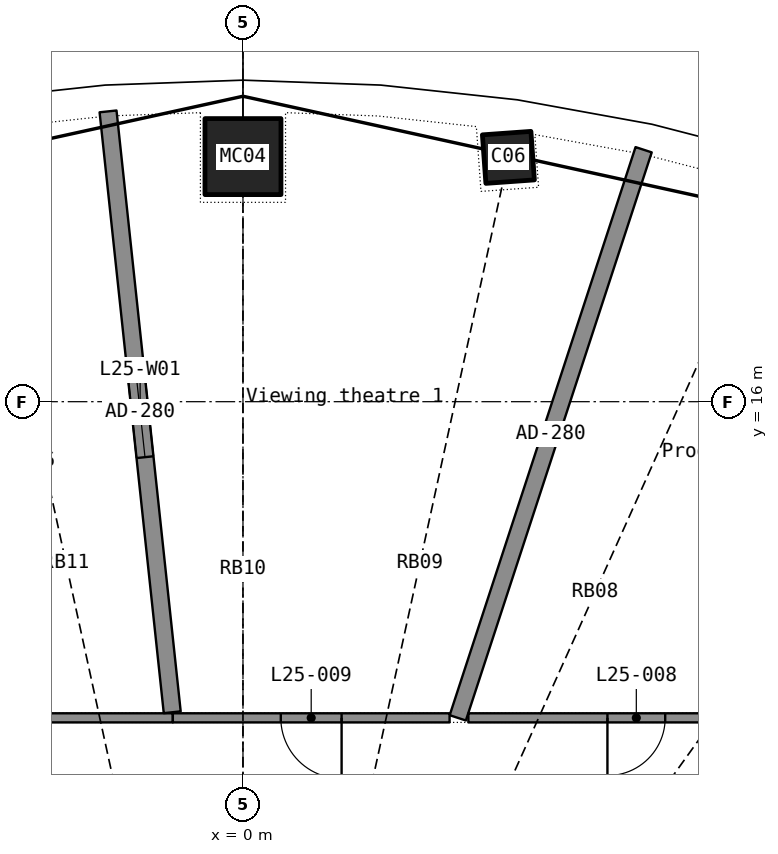
"""IFC4 building model, lengths in metres.
Left out: names, types, materials, properties, quantities, classifications, styles, units other than length and angle.
Written with IfcOpenShell. Run it as: python <this file> out.ifc"""

import sys

from ifc_helpers import new_model, si_unit, direction, frame, frame_2d, origin, origin_2d, place, context, subcontext, project, spatial, rectangle, hollow_rectangle, extrude, element, fill, save


model = new_model("IFC4")
c1 = context("Model", 3, precision=1e-05, world=origin(), true_north=direction((0.0, 1.0)))
c2 = subcontext(c1, "Body", "Model", "MODEL_VIEW")
j1 = project(units=[si_unit("LENGTHUNIT", "METRE"), si_unit("PLANEANGLEUNIT", "RADIAN")], contexts=[c1])
p1 = place(None, origin())
s1 = spatial("IfcSite", under=j1, at=p1, CompositionType="ELEMENT")
p2 = place(p1, origin())
s2 = spatial("IfcBuilding", under=s1, at=p2, CompositionType="ELEMENT")
p3 = place(p2, frame((0.0, 0.0, 108.2)))
s3 = spatial("IfcBuildingStorey", under=s2, at=p3, CompositionType="ELEMENT", Elevation=108.2)
p4 = place(p3, frame((4.365, 20.018, 0.0), z_axis=(-0.006002162, -0.027966118, 0.999590851), x_axis=(0.99018843, -0.139723746, 0.002036574)))
e1 = element("IfcColumn", 1, at=p4, inside=s3, PredefinedType="COLUMN", context=c2, shape_type="SweptSolid", body=[
    extrude(hollow_rectangle(XDim=0.8, YDim=0.8, WallThickness=0.025, at=origin_2d()), origin(), (0.0, 0.0, 1.0), 3.701),
])
p5 = place(p3, frame((0.0, 20.031, 0.0), z_axis=(0.0, -0.02836206, 0.999597716), x_axis=(1.0, 0.0, 0.0)))
e2 = element("IfcColumn", 2, at=p5, inside=s3, PredefinedType="COLUMN", context=c2, shape_type="SweptSolid", body=[
    extrude(hollow_rectangle(XDim=1.25, YDim=1.25, WallThickness=0.032, at=origin_2d()), origin(), (0.0, 0.0, 1.0), 3.701),
])
p6 = place(p3, frame((-1.154, 10.8, 0.0), z_axis=(0.0, 0.0, 1.0), x_axis=(-1.0, 0.0, 0.0)))
e3 = element("IfcWall", 3, at=p6, inside=s3, PredefinedType="PARTITIONING", context=c2, shape_type="SweptSolid", body=[
    extrude(rectangle(XDim=16.646, YDim=0.15, at=frame_2d((8.323, 0.0))), origin(), (0.0, 0.0, 1.0), 2.4),
])
p7 = place(p6, frame((7.723, 0.0, 0.0)))
e4 = element("IfcOpeningElement", 4, at=p7, cuts=e3, PredefinedType="OPENING", context=c2, shape_type="SweptSolid", body=[
    extrude(rectangle(XDim=1.2, YDim=2.2, at=frame_2d((0.6, 1.1))), frame((0.0, 0.085, 0.0), z_axis=(0.0, -1.0, 0.0), x_axis=(1.0, 0.0, 0.0)), (0.0, 0.0, 1.0), 0.17),
])
p8 = place(p3, frame((-2.219, 20.775, 0.0), z_axis=(0.0, 0.0, 1.0), x_axis=(0.106213943, -0.9943433, 0.0)))
e5 = element("IfcWall", 5, at=p8, inside=s3, PredefinedType="PARTITIONING", context=c2, shape_type="SweptSolid", body=[
    extrude(rectangle(XDim=9.939, YDim=0.28, at=frame_2d((4.969, 0.0))), origin(), (0.0, 0.0, 1.0), 2.4),
])
p9 = place(p8, frame((4.219, 0.0, 1.0)))
e6 = element("IfcOpeningElement", 6, at=p9, cuts=e5, PredefinedType="OPENING", context=c2, shape_type="SweptSolid", body=[
    extrude(rectangle(XDim=1.5, YDim=1.2, at=frame_2d((0.75, 0.6))), frame((0.0, 0.15, 0.0), z_axis=(0.0, -1.0, 0.0), x_axis=(1.0, 0.0, 0.0)), (0.0, 0.0, 1.0), 0.3),
])
p10 = place(p3, frame((6.59, 20.144, 0.0), z_axis=(0.0, 0.0, 1.0), x_axis=(-0.310918337, -0.95043663, 0.0)))
e7 = element("IfcWall", 7, at=p10, inside=s3, PredefinedType="PARTITIONING", context=c2, shape_type="SweptSolid", body=[
    extrude(rectangle(XDim=9.831, YDim=0.28, at=frame_2d((4.916, 0.0))), origin(), (0.0, 0.0, 1.0), 2.4),
])
p11 = place(p3, frame((9.231, 10.8, 0.0), z_axis=(0.0, 0.0, 1.0), x_axis=(-1.0, 0.0, 0.0)))
e8 = element("IfcWall", 8, at=p11, inside=s3, PredefinedType="PARTITIONING", context=c2, shape_type="SweptSolid", body=[
    extrude(rectangle(XDim=5.524, YDim=0.15, at=frame_2d((2.762, 0.0))), origin(), (0.0, 0.0, 1.0), 2.4),
])
p12 = place(p11, frame((2.287, 0.0, 0.0)))
e9 = element("IfcOpeningElement", 9, at=p12, cuts=e8, PredefinedType="OPENING", context=c2, shape_type="SweptSolid", body=[
    extrude(rectangle(XDim=0.95, YDim=2.15, at=frame_2d((0.475, 1.075))), frame((0.0, 0.085, 0.0), z_axis=(0.0, -1.0, 0.0), x_axis=(1.0, 0.0, 0.0)), (0.0, 0.0, 1.0), 0.17),
])
p13 = place(p3, frame((3.398, 10.8, 0.0), z_axis=(0.0, 0.0, 1.0), x_axis=(-1.0, 0.0, 0.0)))
e10 = element("IfcWall", 10, at=p13, inside=s3, PredefinedType="PARTITIONING", context=c2, shape_type="SweptSolid", body=[
    extrude(rectangle(XDim=4.551, YDim=0.15, at=frame_2d((2.276, 0.0))), origin(), (0.0, 0.0, 1.0), 2.4),
])
p14 = place(p13, frame((1.776, 0.0, 0.0)))
e11 = element("IfcOpeningElement", 11, at=p14, cuts=e10, PredefinedType="OPENING", context=c2, shape_type="SweptSolid", body=[
    extrude(rectangle(XDim=1.0, YDim=2.2, at=frame_2d((0.5, 1.1))), frame((0.0, 0.085, 0.0), z_axis=(0.0, -1.0, 0.0), x_axis=(1.0, 0.0, 0.0)), (0.0, 0.0, 1.0), 0.17),
])
p15 = place(p12, origin())
e12 = element("IfcDoor", 12, at=p15, inside=s3, OperationType="SINGLE_SWING_RIGHT", PredefinedType="DOOR", context=c2, shape_type="SweptSolid", body=[
    extrude(rectangle(XDim=0.95, YDim=2.15, at=frame_2d((0.475, 1.075))), frame((0.0, 0.025, 0.0), z_axis=(0.0, -1.0, 0.0), x_axis=(1.0, 0.0, 0.0)), (0.0, 0.0, 1.0), 0.05),
])
fill(e9, e12)
p16 = place(p14, origin())
e13 = element("IfcDoor", 13, at=p16, inside=s3, OperationType="SINGLE_SWING_LEFT", PredefinedType="DOOR", context=c2, shape_type="SweptSolid", body=[
    extrude(rectangle(XDim=1.0, YDim=2.2, at=frame_2d((0.5, 1.1))), frame((0.0, 0.025, 0.0), z_axis=(0.0, -1.0, 0.0), x_axis=(1.0, 0.0, 0.0)), (0.0, 0.0, 1.0), 0.05),
])
fill(e11, e13)
p17 = place(p9, origin())
e14 = element("IfcWindow", 14, at=p17, inside=s3, PartitioningType="SINGLE_PANEL", PredefinedType="WINDOW", context=c2, shape_type="SweptSolid", body=[
    extrude(rectangle(XDim=1.5, YDim=1.2, at=frame_2d((0.75, 0.6))), frame((0.0, 0.03, 0.0), z_axis=(0.0, -1.0, 0.0), x_axis=(1.0, 0.0, 0.0)), (0.0, 0.0, 1.0), 0.06),
])
fill(e6, e14)
save(model, sys.argv[1])
